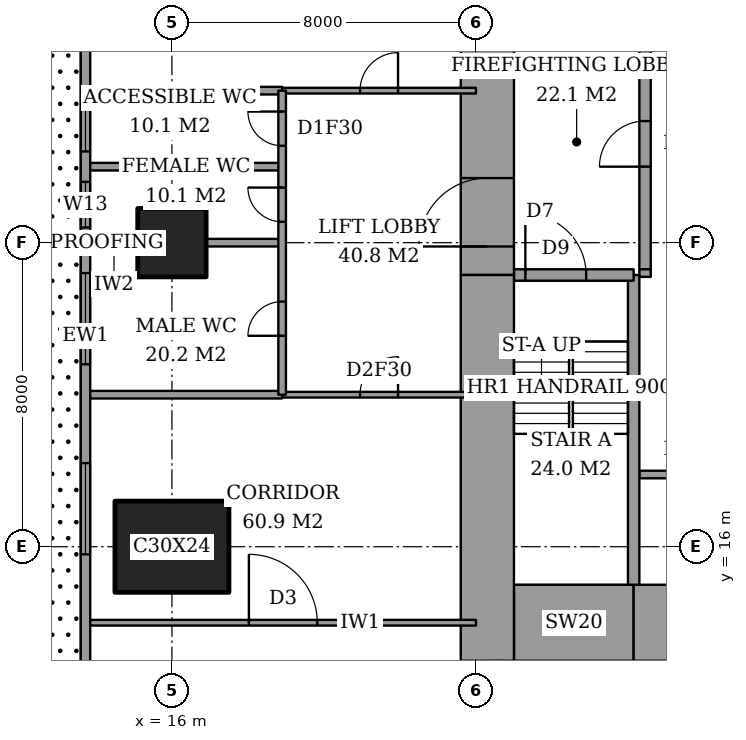
"""IFC4 building model, lengths in metres.
Left out: names, types, materials, properties, quantities, classifications, styles, units other than length and angle.
Written with IfcOpenShell. Run it as: python <this file> out.ifc"""

import sys

from ifc_helpers import new_model, si_unit, direction, frame, frame_2d, origin, origin_2d, place, context, subcontext, project, spatial, rectangle, extrude, element, fill, save


model = new_model("IFC4")
c1 = context("Model", 3, precision=1e-05, world=origin(), true_north=direction((0.0, 1.0)))
c2 = subcontext(c1, "Body", "Model", "MODEL_VIEW")
j1 = project(units=[si_unit("LENGTHUNIT", "METRE"), si_unit("PLANEANGLEUNIT", "RADIAN")], contexts=[c1])
p1 = place(None, origin())
s1 = spatial("IfcSite", under=j1, at=p1, CompositionType="ELEMENT")
p2 = place(p1, origin())
s2 = spatial("IfcBuilding", under=s1, at=p2, CompositionType="ELEMENT")
p3 = place(p2, frame((0.0, 0.0, 221.8)))
s3 = spatial("IfcBuildingStorey", under=s2, at=p3, CompositionType="ELEMENT", Elevation=221.8)
p4 = place(p3, frame((16.0, 16.0, 0.0), z_axis=(0.0, 0.0, 1.0), x_axis=(1.0, 0.0, 0.0)))
e1 = element("IfcColumn", 1, at=p4, inside=s3, PredefinedType="COLUMN", context=c2, shape_type="SweptSolid", body=[
    extrude(rectangle(XDim=3.0, YDim=2.4, at=origin_2d()), origin(), (0.0, 0.0, 1.0), 3.6),
])
p5 = place(p3, frame((16.0, 24.0, 0.0), z_axis=(0.0, 0.0, 1.0), x_axis=(1.0, 0.0, 0.0)))
e2 = element("IfcColumn", 2, at=p5, inside=s3, PredefinedType="COLUMN", context=c2, shape_type="SweptSolid", body=[
    extrude(rectangle(XDim=1.8, YDim=1.8, at=origin_2d()), origin(), (0.0, 0.0, 1.0), 3.6),
])
p6 = place(p3, frame((25.0, 14.0, 0.0), z_axis=(0.0, 0.0, 1.0), x_axis=(1.0, 0.0, 0.0)))
e3 = element("IfcWall", 3, at=p6, inside=s3, PredefinedType="SHEAR", context=c2, shape_type="SweptSolid", body=[
    extrude(rectangle(XDim=3.15, YDim=2.0, at=frame_2d((1.575, 0.0))), origin(), (0.0, 0.0, 1.0), 3.6),
])
p7 = place(p3, frame((28.15, 14.0, 0.0), z_axis=(0.0, 0.0, 1.0), x_axis=(1.0, 0.0, 0.0)))
e4 = element("IfcWall", 4, at=p7, inside=s3, PredefinedType="SHEAR", context=c2, shape_type="SweptSolid", body=[
    extrude(rectangle(XDim=9.7, YDim=2.0, at=frame_2d((4.85, 0.0))), origin(), (0.0, 0.0, 1.0), 3.6),
])
p8 = place(p3, frame((24.3, 13.0, 0.0), z_axis=(0.0, 0.0, 1.0), x_axis=(0.0, 1.0, 0.0)))
e5 = element("IfcWall", 5, at=p8, inside=s3, PredefinedType="SHEAR", context=c2, shape_type="SweptSolid", body=[
    extrude(rectangle(XDim=10.15, YDim=1.4, at=frame_2d((5.075, 0.0))), origin(), (0.0, 0.0, 1.0), 3.6),
])
p9 = place(p3, frame((24.3, 23.15, 0.0), z_axis=(0.0, 0.0, 1.0), x_axis=(0.0, 1.0, 0.0)))
e6 = element("IfcWall", 6, at=p9, inside=s3, PredefinedType="SHEAR", context=c2, shape_type="SweptSolid", body=[
    extrude(rectangle(XDim=11.85, YDim=1.4, at=frame_2d((5.925, 0.0))), origin(), (0.0, 0.0, 1.0), 3.6),
])
p10 = place(p9, frame((0.75, 0.0, 0.0)))
e7 = element("IfcOpeningElement", 7, at=p10, cuts=e6, PredefinedType="OPENING", context=c2, shape_type="SweptSolid", body=[
    extrude(rectangle(XDim=1.8, YDim=2.4, at=frame_2d((0.9, 1.2))), frame((0.0, 0.71, 0.0), z_axis=(0.0, -1.0, 0.0), x_axis=(1.0, 0.0, 0.0)), (0.0, 0.0, 1.0), 1.42),
])
p11 = place(p3, frame((28.15, 15.0, 0.0), z_axis=(0.0, 0.0, 1.0), x_axis=(0.0, 1.0, 0.0)))
e8 = element("IfcWall", 8, at=p11, inside=s3, PredefinedType="SHEAR", context=c2, shape_type="SweptSolid", body=[
    extrude(rectangle(XDim=8.15, YDim=0.3, at=frame_2d((4.075, 0.0))), origin(), (0.0, 0.0, 1.0), 3.6),
])
p12 = place(p3, frame((25.0, 23.15, 0.0), z_axis=(0.0, 0.0, 1.0), x_axis=(1.0, 0.0, 0.0)))
e9 = element("IfcWall", 9, at=p12, inside=s3, PredefinedType="SHEAR", context=c2, shape_type="SweptSolid", body=[
    extrude(rectangle(XDim=3.15, YDim=0.3, at=frame_2d((1.575, 0.0))), origin(), (0.0, 0.0, 1.0), 3.6),
])
p13 = place(p12, frame((0.3, 0.0, 0.0)))
e10 = element("IfcOpeningElement", 10, at=p13, cuts=e9, PredefinedType="OPENING", context=c2, shape_type="SweptSolid", body=[
    extrude(rectangle(XDim=1.6, YDim=2.1, at=frame_2d((0.8, 1.05))), frame((0.0, 0.16, 0.0), z_axis=(0.0, -1.0, 0.0), x_axis=(1.0, 0.0, 0.0)), (0.0, 0.0, 1.0), 0.32),
])
p14 = place(p3, frame((28.45, 23.3, 0.0), z_axis=(0.0, 0.0, 1.0), x_axis=(0.0, 1.0, 0.0)))
e11 = element("IfcWall", 11, at=p14, inside=s3, PredefinedType="PARTITIONING", context=c2, shape_type="SweptSolid", body=[
    extrude(rectangle(XDim=6.7, YDim=0.3, at=frame_2d((3.35, 0.0))), origin(), (0.0, 0.0, 1.0), 3.6),
])
p15 = place(p14, frame((2.7, 0.0, 0.0)))
e12 = element("IfcOpeningElement", 12, at=p15, cuts=e11, PredefinedType="OPENING", context=c2, shape_type="SweptSolid", body=[
    extrude(rectangle(XDim=1.2, YDim=2.1, at=frame_2d((0.6, 1.05))), frame((0.0, 0.16, 0.0), z_axis=(0.0, -1.0, 0.0), x_axis=(1.0, 0.0, 0.0)), (0.0, 0.0, 1.0), 0.32),
])
p16 = place(p3, frame((13.725, 48.575, 0.0), z_axis=(0.0, 0.0, 1.0), x_axis=(0.0, -1.0, 0.0)))
e13 = element("IfcWall", 13, at=p16, inside=s3, PredefinedType="SOLIDWALL", context=c2, shape_type="SweptSolid", body=[
    extrude(rectangle(XDim=49.15, YDim=0.25, at=frame_2d((24.575, 0.0))), origin(), (0.0, 0.0, 1.0), 3.6),
])
p17 = place(p16, frame((7.85, 0.0, 0.0)))
e14 = element("IfcOpeningElement", 14, at=p17, cuts=e13, PredefinedType="OPENING", context=c2, shape_type="SweptSolid", body=[
    extrude(rectangle(XDim=1.0, YDim=2.4, at=frame_2d((0.5, 1.2))), frame((0.0, 0.135, 0.0), z_axis=(0.0, -1.0, 0.0), x_axis=(1.0, 0.0, 0.0)), (0.0, 0.0, 1.0), 0.27),
])
p18 = place(p16, frame((0.931, 0.0, 0.2)))
e15 = element("IfcOpeningElement", 15, at=p18, cuts=e13, PredefinedType="OPENING", context=c2, shape_type="SweptSolid", body=[
    extrude(rectangle(XDim=2.4, YDim=2.4, at=frame_2d((1.2, 1.2))), frame((0.0, 0.135, 0.0), z_axis=(0.0, -1.0, 0.0), x_axis=(1.0, 0.0, 0.0)), (0.0, 0.0, 1.0), 0.27),
])
p19 = place(p16, frame((4.344, 0.0, 0.2)))
e16 = element("IfcOpeningElement", 16, at=p19, cuts=e13, PredefinedType="OPENING", context=c2, shape_type="SweptSolid", body=[
    extrude(rectangle(XDim=2.4, YDim=2.4, at=frame_2d((1.2, 1.2))), frame((0.0, 0.135, 0.0), z_axis=(0.0, -1.0, 0.0), x_axis=(1.0, 0.0, 0.0)), (0.0, 0.0, 1.0), 0.27),
])
p20 = place(p16, frame((10.663, 0.0, 0.2)))
e17 = element("IfcOpeningElement", 17, at=p20, cuts=e13, PredefinedType="OPENING", context=c2, shape_type="SweptSolid", body=[
    extrude(rectangle(XDim=2.4, YDim=2.4, at=frame_2d((1.2, 1.2))), frame((0.0, 0.135, 0.0), z_axis=(0.0, -1.0, 0.0), x_axis=(1.0, 0.0, 0.0)), (0.0, 0.0, 1.0), 0.27),
])
p21 = place(p16, frame((16.375, 0.0, 0.2)))
e18 = element("IfcOpeningElement", 18, at=p21, cuts=e13, PredefinedType="OPENING", context=c2, shape_type="SweptSolid", body=[
    extrude(rectangle(XDim=2.4, YDim=2.4, at=frame_2d((1.2, 1.2))), frame((0.0, 0.135, 0.0), z_axis=(0.0, -1.0, 0.0), x_axis=(1.0, 0.0, 0.0)), (0.0, 0.0, 1.0), 0.27),
])
p22 = place(p16, frame((20.975, 0.0, 0.2)))
e19 = element("IfcOpeningElement", 19, at=p22, cuts=e13, PredefinedType="OPENING", context=c2, shape_type="SweptSolid", body=[
    extrude(rectangle(XDim=1.2, YDim=2.4, at=frame_2d((0.6, 1.2))), frame((0.0, 0.135, 0.0), z_axis=(0.0, -1.0, 0.0), x_axis=(1.0, 0.0, 0.0)), (0.0, 0.0, 1.0), 0.27),
])
p23 = place(p16, frame((22.975, 0.0, 0.2)))
e20 = element("IfcOpeningElement", 20, at=p23, cuts=e13, PredefinedType="OPENING", context=c2, shape_type="SweptSolid", body=[
    extrude(rectangle(XDim=1.2, YDim=2.4, at=frame_2d((0.6, 1.2))), frame((0.0, 0.135, 0.0), z_axis=(0.0, -1.0, 0.0), x_axis=(1.0, 0.0, 0.0)), (0.0, 0.0, 1.0), 0.27),
])
p24 = place(p16, frame((25.375, 0.0, 0.2)))
e21 = element("IfcOpeningElement", 21, at=p24, cuts=e13, PredefinedType="OPENING", context=c2, shape_type="SweptSolid", body=[
    extrude(rectangle(XDim=2.4, YDim=2.4, at=frame_2d((1.2, 1.2))), frame((0.0, 0.135, 0.0), z_axis=(0.0, -1.0, 0.0), x_axis=(1.0, 0.0, 0.0)), (0.0, 0.0, 1.0), 0.27),
])
p25 = place(p16, frame((30.375, 0.0, 0.2)))
e22 = element("IfcOpeningElement", 22, at=p25, cuts=e13, PredefinedType="OPENING", context=c2, shape_type="SweptSolid", body=[
    extrude(rectangle(XDim=2.4, YDim=2.4, at=frame_2d((1.2, 1.2))), frame((0.0, 0.135, 0.0), z_axis=(0.0, -1.0, 0.0), x_axis=(1.0, 0.0, 0.0)), (0.0, 0.0, 1.0), 0.27),
])
p26 = place(p16, frame((41.3, 0.0, 0.0)))
e23 = element("IfcOpeningElement", 23, at=p26, cuts=e13, PredefinedType="OPENING", context=c2, shape_type="SweptSolid", body=[
    extrude(rectangle(XDim=1.0, YDim=2.4, at=frame_2d((0.5, 1.2))), frame((0.0, 0.135, 0.0), z_axis=(0.0, -1.0, 0.0), x_axis=(1.0, 0.0, 0.0)), (0.0, 0.0, 1.0), 0.27),
])
p27 = place(p16, frame((36.587, 0.0, 0.2)))
e24 = element("IfcOpeningElement", 24, at=p27, cuts=e13, PredefinedType="OPENING", context=c2, shape_type="SweptSolid", body=[
    extrude(rectangle(XDim=2.4, YDim=2.4, at=frame_2d((1.2, 1.2))), frame((0.0, 0.135, 0.0), z_axis=(0.0, -1.0, 0.0), x_axis=(1.0, 0.0, 0.0)), (0.0, 0.0, 1.0), 0.27),
])
p28 = place(p16, frame((44.613, 0.0, 0.2)))
e25 = element("IfcOpeningElement", 25, at=p28, cuts=e13, PredefinedType="OPENING", context=c2, shape_type="SweptSolid", body=[
    extrude(rectangle(XDim=2.4, YDim=2.4, at=frame_2d((1.2, 1.2))), frame((0.0, 0.135, 0.0), z_axis=(0.0, -1.0, 0.0), x_axis=(1.0, 0.0, 0.0)), (0.0, 0.0, 1.0), 0.27),
])
p29 = place(p3, frame((13.85, 14.0, 0.0), z_axis=(0.0, 0.0, 1.0), x_axis=(1.0, 0.0, 0.0)))
e26 = element("IfcWall", 26, at=p29, inside=s3, PredefinedType="PARTITIONING", context=c2, shape_type="SweptSolid", body=[
    extrude(rectangle(XDim=10.15, YDim=0.15, at=frame_2d((5.075, 0.0))), origin(), (0.0, 0.0, 1.0), 3.25),
])
p30 = place(p29, frame((4.175, 0.0, 0.0)))
e27 = element("IfcOpeningElement", 27, at=p30, cuts=e26, PredefinedType="OPENING", context=c2, shape_type="SweptSolid", body=[
    extrude(rectangle(XDim=1.8, YDim=2.1, at=frame_2d((0.9, 1.05))), frame((0.0, 0.085, 0.0), z_axis=(0.0, -1.0, 0.0), x_axis=(1.0, 0.0, 0.0)), (0.0, 0.0, 1.0), 0.17),
])
p31 = place(p3, frame((13.85, 20.0, 0.0), z_axis=(0.0, 0.0, 1.0), x_axis=(1.0, 0.0, 0.0)))
e28 = element("IfcWall", 28, at=p31, inside=s3, PredefinedType="PARTITIONING", context=c2, shape_type="SweptSolid", body=[
    extrude(rectangle(XDim=5.05, YDim=0.2, at=frame_2d((2.525, 0.0))), origin(), (0.0, 0.0, 1.0), 3.25),
])
p32 = place(p3, frame((18.9, 20.0, 0.0), z_axis=(0.0, 0.0, 1.0), x_axis=(1.0, 0.0, 0.0)))
e29 = element("IfcWall", 29, at=p32, inside=s3, PredefinedType="PARTITIONING", context=c2, shape_type="SweptSolid", body=[
    extrude(rectangle(XDim=5.1, YDim=0.15, at=frame_2d((2.55, 0.0))), origin(), (0.0, 0.0, 1.0), 3.25),
])
p33 = place(p32, frame((2.05, 0.0, 0.0)))
e30 = element("IfcOpeningElement", 30, at=p33, cuts=e29, PredefinedType="OPENING", context=c2, shape_type="SweptSolid", body=[
    extrude(rectangle(XDim=1.0, YDim=2.1, at=frame_2d((0.5, 1.05))), frame((0.0, 0.085, 0.0), z_axis=(0.0, -1.0, 0.0), x_axis=(1.0, 0.0, 0.0)), (0.0, 0.0, 1.0), 0.17),
])
p34 = place(p3, frame((13.85, 24.0, 0.0), z_axis=(0.0, 0.0, 1.0), x_axis=(1.0, 0.0, 0.0)))
e31 = element("IfcWall", 31, at=p34, inside=s3, PredefinedType="PARTITIONING", context=c2, shape_type="SweptSolid", body=[
    extrude(rectangle(XDim=1.25, YDim=0.2, at=frame_2d((0.625, 0.0))), origin(), (0.0, 0.0, 1.0), 3.25),
])
p35 = place(p3, frame((16.9, 24.0, 0.0), z_axis=(0.0, 0.0, 1.0), x_axis=(1.0, 0.0, 0.0)))
e32 = element("IfcWall", 32, at=p35, inside=s3, PredefinedType="PARTITIONING", context=c2, shape_type="SweptSolid", body=[
    extrude(rectangle(XDim=2.0, YDim=0.2, at=frame_2d((1.0, 0.0))), origin(), (0.0, 0.0, 1.0), 3.25),
])
for number, where, z_axis, x_axis in (
    (33, (13.85, 26.0, 0.0), (0.0, 0.0, 1.0), (1.0, 0.0, 0.0)),
    (34, (13.85, 28.0, 0.0), (0.0, 0.0, 1.0), (1.0, 0.0, 0.0)),
):
    element("IfcWall", number, at=place(p3, frame(where, z_axis=z_axis, x_axis=x_axis)), inside=s3, PredefinedType="PARTITIONING", context=c2, shape_type="SweptSolid", body=[
        extrude(rectangle(XDim=5.05, YDim=0.2, at=frame_2d((2.525, 0.0))), origin(), (0.0, 0.0, 1.0), 3.25),
    ])
p36 = place(p3, frame((18.9, 28.0, 0.0), z_axis=(0.0, 0.0, 1.0), x_axis=(1.0, 0.0, 0.0)))
e35 = element("IfcWall", 35, at=p36, inside=s3, PredefinedType="PARTITIONING", context=c2, shape_type="SweptSolid", body=[
    extrude(rectangle(XDim=5.1, YDim=0.15, at=frame_2d((2.55, 0.0))), origin(), (0.0, 0.0, 1.0), 3.25),
])
p37 = place(p36, frame((2.05, 0.0, 0.0)))
e36 = element("IfcOpeningElement", 36, at=p37, cuts=e35, PredefinedType="OPENING", context=c2, shape_type="SweptSolid", body=[
    extrude(rectangle(XDim=1.0, YDim=2.1, at=frame_2d((0.5, 1.05))), frame((0.0, 0.085, 0.0), z_axis=(0.0, -1.0, 0.0), x_axis=(1.0, 0.0, 0.0)), (0.0, 0.0, 1.0), 0.17),
])
p38 = place(p3, frame((18.9, 20.0, 0.0), z_axis=(0.0, 0.0, 1.0), x_axis=(0.0, 1.0, 0.0)))
e37 = element("IfcWall", 37, at=p38, inside=s3, PredefinedType="PARTITIONING", context=c2, shape_type="SweptSolid", body=[
    extrude(rectangle(XDim=8.0, YDim=0.2, at=frame_2d((4.0, 0.0))), origin(), (0.0, 0.0, 1.0), 3.25),
])
p39 = place(p38, frame((1.55, 0.0, 0.0)))
e38 = element("IfcOpeningElement", 38, at=p39, cuts=e37, PredefinedType="OPENING", context=c2, shape_type="SweptSolid", body=[
    extrude(rectangle(XDim=0.9, YDim=2.1, at=frame_2d((0.45, 1.05))), frame((0.0, 0.11, 0.0), z_axis=(0.0, -1.0, 0.0), x_axis=(1.0, 0.0, 0.0)), (0.0, 0.0, 1.0), 0.22),
])
p40 = place(p38, frame((4.55, 0.0, 0.0)))
e39 = element("IfcOpeningElement", 39, at=p40, cuts=e37, PredefinedType="OPENING", context=c2, shape_type="SweptSolid", body=[
    extrude(rectangle(XDim=0.9, YDim=2.1, at=frame_2d((0.45, 1.05))), frame((0.0, 0.11, 0.0), z_axis=(0.0, -1.0, 0.0), x_axis=(1.0, 0.0, 0.0)), (0.0, 0.0, 1.0), 0.22),
])
p41 = place(p38, frame((6.55, 0.0, 0.0)))
e40 = element("IfcOpeningElement", 40, at=p41, cuts=e37, PredefinedType="OPENING", context=c2, shape_type="SweptSolid", body=[
    extrude(rectangle(XDim=0.9, YDim=2.1, at=frame_2d((0.45, 1.05))), frame((0.0, 0.11, 0.0), z_axis=(0.0, -1.0, 0.0), x_axis=(1.0, 0.0, 0.0)), (0.0, 0.0, 1.0), 0.22),
])
p42 = place(p3, frame((28.3, 17.9, 0.0), z_axis=(0.0, 0.0, 1.0), x_axis=(1.0, 0.0, 0.0)))
e41 = element("IfcWall", 41, at=p42, inside=s3, PredefinedType="PARTITIONING", context=c2, shape_type="SweptSolid", body=[
    extrude(rectangle(XDim=12.7, YDim=0.2, at=frame_2d((6.35, 0.0))), origin(), (0.0, 0.0, 1.0), 3.6),
])
p43 = place(p42, frame((1.05, 0.0, 0.0)))
e42 = element("IfcOpeningElement", 42, at=p43, cuts=e41, PredefinedType="OPENING", context=c2, shape_type="SweptSolid", body=[
    extrude(rectangle(XDim=0.9, YDim=2.1, at=frame_2d((0.45, 1.05))), frame((0.0, 0.11, 0.0), z_axis=(0.0, -1.0, 0.0), x_axis=(1.0, 0.0, 0.0)), (0.0, 0.0, 1.0), 0.22),
])
p44 = place(p42, frame((10.6, 0.0, 0.0)))
e43 = element("IfcOpeningElement", 43, at=p44, cuts=e41, PredefinedType="OPENING", context=c2, shape_type="SweptSolid", body=[
    extrude(rectangle(XDim=1.2, YDim=2.1, at=frame_2d((0.6, 1.05))), frame((0.0, 0.11, 0.0), z_axis=(0.0, -1.0, 0.0), x_axis=(1.0, 0.0, 0.0)), (0.0, 0.0, 1.0), 0.22),
])
p45 = place(p3, frame((28.3, 23.2, 0.0), z_axis=(0.0, 0.0, 1.0), x_axis=(1.0, 0.0, 0.0)))
e44 = element("IfcWall", 44, at=p45, inside=s3, PredefinedType="PARTITIONING", context=c2, shape_type="SweptSolid", body=[
    extrude(rectangle(XDim=0.3, YDim=0.2, at=frame_2d((0.15, 0.0))), origin(), (0.0, 0.0, 1.0), 3.6),
])
p46 = place(p22, origin())
e45 = element("IfcWindow", 45, at=p46, inside=s3, PartitioningType="SINGLE_PANEL", PredefinedType="WINDOW", context=c2, shape_type="SweptSolid", body=[
    extrude(rectangle(XDim=1.2, YDim=2.4, at=frame_2d((0.6, 1.2))), frame((0.0, 0.03, 0.0), z_axis=(0.0, -1.0, 0.0), x_axis=(1.0, 0.0, 0.0)), (0.0, 0.0, 1.0), 0.06),
])
fill(e19, e45)
p47 = place(p23, origin())
e46 = element("IfcWindow", 46, at=p47, inside=s3, PartitioningType="SINGLE_PANEL", PredefinedType="WINDOW", context=c2, shape_type="SweptSolid", body=[
    extrude(rectangle(XDim=1.2, YDim=2.4, at=frame_2d((0.6, 1.2))), frame((0.0, 0.03, 0.0), z_axis=(0.0, -1.0, 0.0), x_axis=(1.0, 0.0, 0.0)), (0.0, 0.0, 1.0), 0.06),
])
fill(e20, e46)
p48 = place(p24, origin())
e47 = element("IfcWindow", 47, at=p48, inside=s3, PartitioningType="SINGLE_PANEL", PredefinedType="WINDOW", context=c2, shape_type="SweptSolid", body=[
    extrude(rectangle(XDim=2.4, YDim=2.4, at=frame_2d((1.2, 1.2))), frame((0.0, 0.03, 0.0), z_axis=(0.0, -1.0, 0.0), x_axis=(1.0, 0.0, 0.0)), (0.0, 0.0, 1.0), 0.06),
])
fill(e21, e47)
p49 = place(p25, origin())
e48 = element("IfcWindow", 48, at=p49, inside=s3, PartitioningType="SINGLE_PANEL", PredefinedType="WINDOW", context=c2, shape_type="SweptSolid", body=[
    extrude(rectangle(XDim=2.4, YDim=2.4, at=frame_2d((1.2, 1.2))), frame((0.0, 0.03, 0.0), z_axis=(0.0, -1.0, 0.0), x_axis=(1.0, 0.0, 0.0)), (0.0, 0.0, 1.0), 0.06),
])
fill(e22, e48)
p50 = place(p30, origin())
e49 = element("IfcDoor", 49, at=p50, inside=s3, OperationType="DOUBLE_DOOR_DOUBLE_SWING", PredefinedType="DOOR", context=c2, shape_type="SweptSolid", body=[
    extrude(rectangle(XDim=1.8, YDim=2.1, at=frame_2d((0.9, 1.05))), frame((0.0, 0.025, 0.0), z_axis=(0.0, -1.0, 0.0), x_axis=(1.0, 0.0, 0.0)), (0.0, 0.0, 1.0), 0.05),
])
fill(e27, e49)
p51 = place(p33, origin())
e50 = element("IfcDoor", 50, at=p51, inside=s3, OperationType="SINGLE_SWING_LEFT", PredefinedType="DOOR", context=c2, shape_type="SweptSolid", body=[
    extrude(rectangle(XDim=1.0, YDim=2.1, at=frame_2d((0.5, 1.05))), frame((0.0, 0.025, 0.0), z_axis=(0.0, -1.0, 0.0), x_axis=(1.0, 0.0, 0.0)), (0.0, 0.0, 1.0), 0.05),
])
fill(e30, e50)
p52 = place(p37, origin())
e51 = element("IfcDoor", 51, at=p52, inside=s3, OperationType="SINGLE_SWING_LEFT", PredefinedType="DOOR", context=c2, shape_type="SweptSolid", body=[
    extrude(rectangle(XDim=1.0, YDim=2.1, at=frame_2d((0.5, 1.05))), frame((0.0, 0.025, 0.0), z_axis=(0.0, -1.0, 0.0), x_axis=(1.0, 0.0, 0.0)), (0.0, 0.0, 1.0), 0.05),
])
fill(e36, e51)
p53 = place(p39, origin())
e52 = element("IfcDoor", 52, at=p53, inside=s3, OperationType="SINGLE_SWING_RIGHT", PredefinedType="DOOR", context=c2, shape_type="SweptSolid", body=[
    extrude(rectangle(XDim=0.9, YDim=2.1, at=frame_2d((0.45, 1.05))), frame((0.0, 0.025, 0.0), z_axis=(0.0, -1.0, 0.0), x_axis=(1.0, 0.0, 0.0)), (0.0, 0.0, 1.0), 0.05),
])
fill(e38, e52)
p54 = place(p40, origin())
e53 = element("IfcDoor", 53, at=p54, inside=s3, OperationType="SINGLE_SWING_LEFT", PredefinedType="DOOR", context=c2, shape_type="SweptSolid", body=[
    extrude(rectangle(XDim=0.9, YDim=2.1, at=frame_2d((0.45, 1.05))), frame((0.0, 0.025, 0.0), z_axis=(0.0, -1.0, 0.0), x_axis=(1.0, 0.0, 0.0)), (0.0, 0.0, 1.0), 0.05),
])
fill(e39, e53)
p55 = place(p41, origin())
e54 = element("IfcDoor", 54, at=p55, inside=s3, OperationType="SINGLE_SWING_LEFT", PredefinedType="DOOR", context=c2, shape_type="SweptSolid", body=[
    extrude(rectangle(XDim=0.9, YDim=2.1, at=frame_2d((0.45, 1.05))), frame((0.0, 0.025, 0.0), z_axis=(0.0, -1.0, 0.0), x_axis=(1.0, 0.0, 0.0)), (0.0, 0.0, 1.0), 0.05),
])
fill(e40, e54)
p56 = place(p13, origin())
e55 = element("IfcDoor", 55, at=p56, inside=s3, OperationType="DOUBLE_DOOR_SINGLE_SWING", PredefinedType="DOOR", context=c2, shape_type="SweptSolid", body=[
    extrude(rectangle(XDim=1.6, YDim=2.1, at=frame_2d((0.8, 1.05))), frame((0.0, 0.025, 0.0), z_axis=(0.0, -1.0, 0.0), x_axis=(1.0, 0.0, 0.0)), (0.0, 0.0, 1.0), 0.05),
])
fill(e10, e55)
p57 = place(p15, origin())
e56 = element("IfcDoor", 56, at=p57, inside=s3, OperationType="SINGLE_SWING_RIGHT", PredefinedType="DOOR", context=c2, shape_type="SweptSolid", body=[
    extrude(rectangle(XDim=1.2, YDim=2.1, at=frame_2d((0.6, 1.05))), frame((0.0, 0.025, 0.0), z_axis=(0.0, -1.0, 0.0), x_axis=(1.0, 0.0, 0.0)), (0.0, 0.0, 1.0), 0.05),
])
fill(e12, e56)
p58 = place(p10, origin())
e57 = element("IfcDoor", 57, at=p58, inside=s3, OperationType="DOUBLE_DOOR_DOUBLE_SWING", PredefinedType="DOOR", context=c2, shape_type="SweptSolid", body=[
    extrude(rectangle(XDim=1.8, YDim=2.4, at=frame_2d((0.9, 1.2))), frame((0.0, 0.025, 0.0), z_axis=(0.0, -1.0, 0.0), x_axis=(1.0, 0.0, 0.0)), (0.0, 0.0, 1.0), 0.05),
])
fill(e7, e57)
save(model, sys.argv[1])
